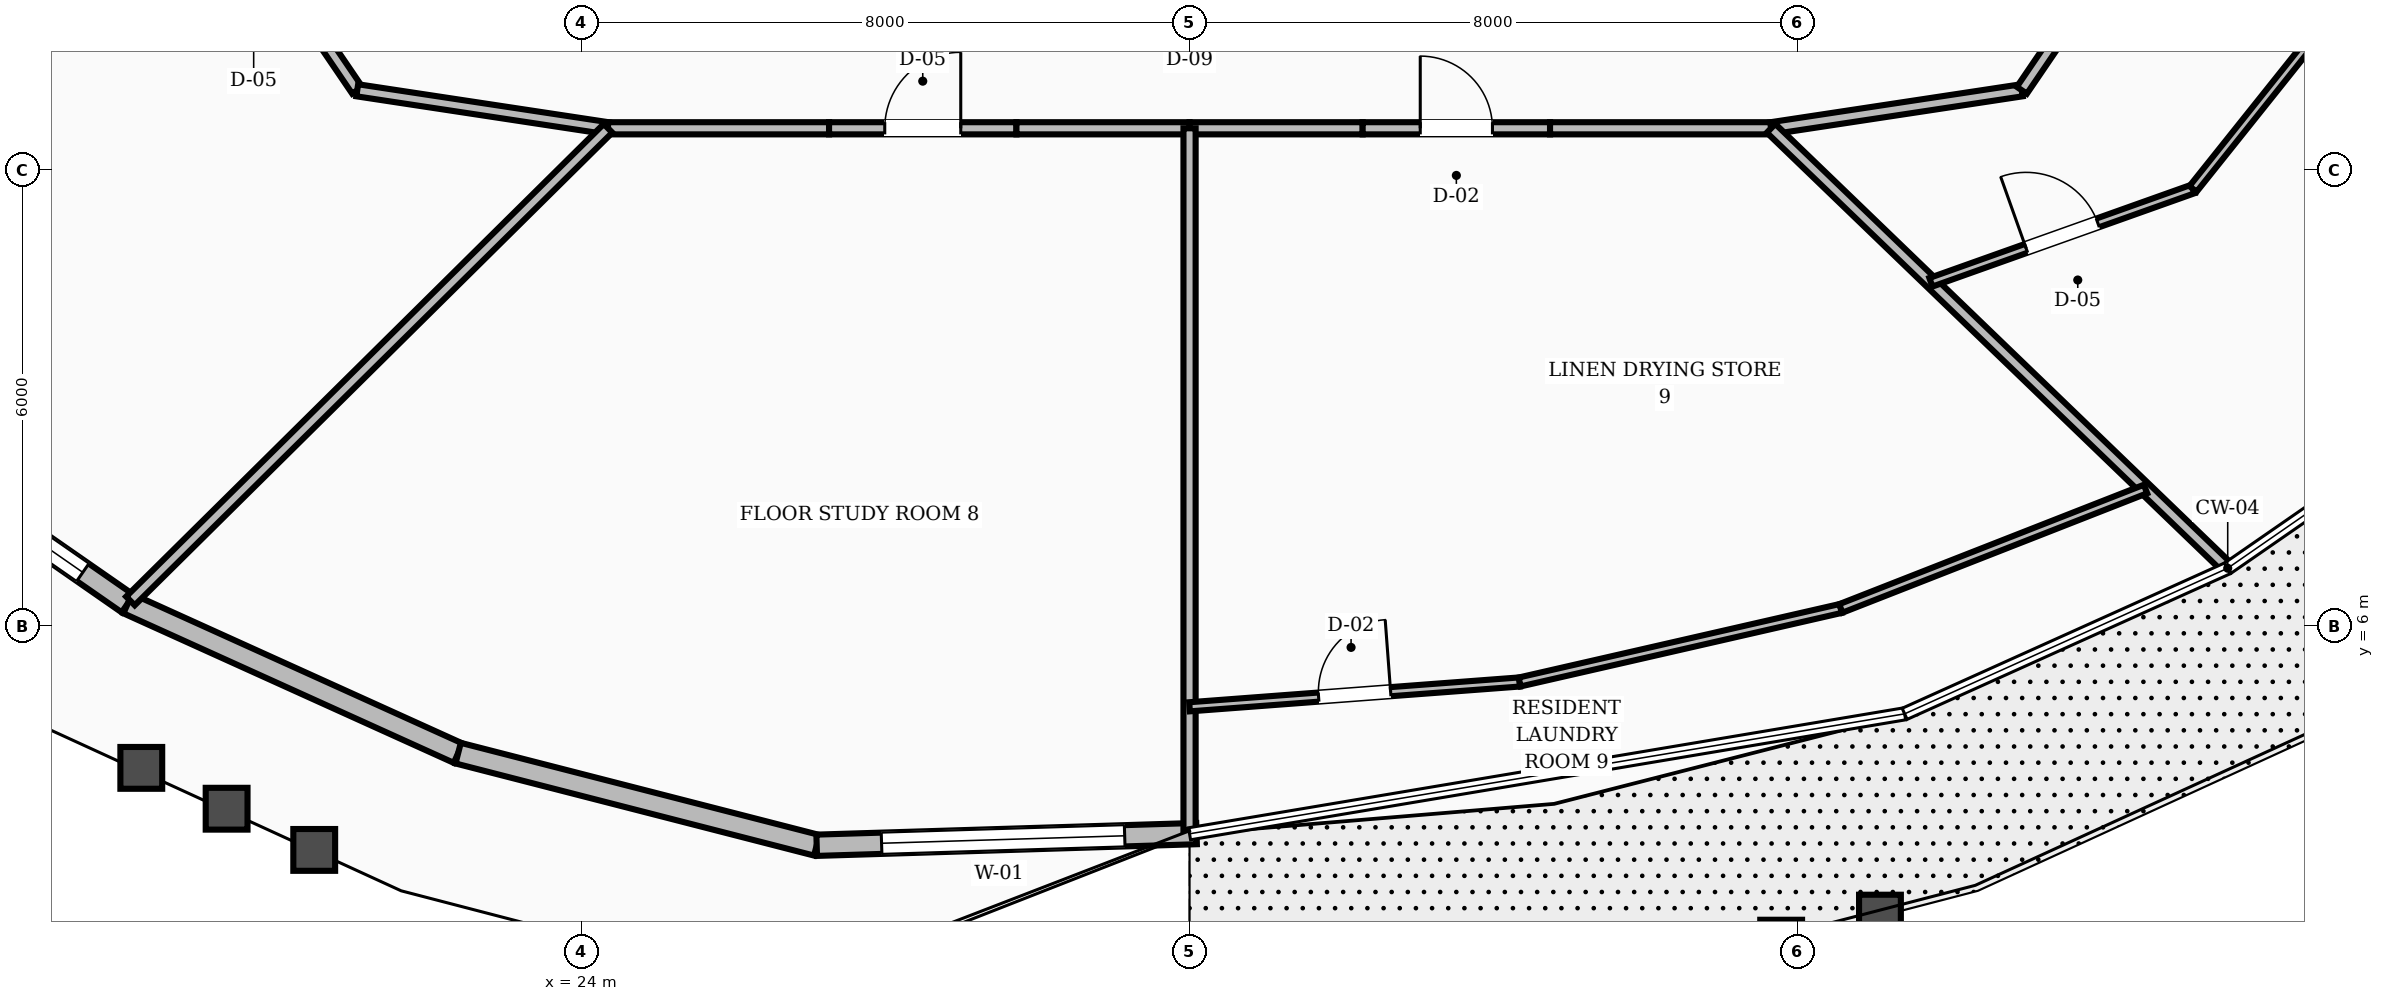
"""IFC4 building model, lengths in metres.
Left out: names, types, materials, properties, quantities, classifications, styles, units other than length and angle.
Written with IfcOpenShell. Run it as: python <this file> out.ifc"""

import sys

from ifc_helpers import new_model, si_unit, direction, frame, frame_2d, origin, place, context, subcontext, project, spatial, rectangle, extrude, element, fill, save


model = new_model("IFC4")
c1 = context("Model", 3, precision=1e-05, world=origin(), true_north=direction((0.0, 1.0)))
c2 = subcontext(c1, "Body", "Model", "MODEL_VIEW")
j1 = project(units=[si_unit("LENGTHUNIT", "METRE"), si_unit("PLANEANGLEUNIT", "RADIAN")], contexts=[c1])
p1 = place(None, origin())
s1 = spatial("IfcSite", under=j1, at=p1, CompositionType="ELEMENT")
p2 = place(p1, origin())
s2 = spatial("IfcBuilding", under=s1, at=p2, CompositionType="ELEMENT")
p3 = place(p2, frame((0.0, 0.0, 189.2)))
s3 = spatial("IfcBuildingStorey", under=s2, at=p3, CompositionType="ELEMENT", Elevation=189.2)
p4 = place(p3, frame((14.22, 8.945, 0.0), z_axis=(0.0, 0.0, 1.0), x_axis=(0.821202162047, -0.570637370885, 0.0)))
e1 = element("IfcWall", 1, at=p4, inside=s3, PredefinedType="STANDARD", context=c2, shape_type="SweptSolid", body=[
    extrude(rectangle(XDim=4.64, YDim=0.28, at=frame_2d((2.32, 0.0))), origin(), (0.0, 0.0, 1.0), 2.82),
])
p5 = place(p4, frame((0.72, 0.0, 0.8)))
e2 = element("IfcOpeningElement", 2, at=p5, cuts=e1, PredefinedType="OPENING", context=c2, shape_type="SweptSolid", body=[
    extrude(rectangle(XDim=3.2, YDim=1.65, at=frame_2d((1.6, 0.825))), frame((0.0, 0.15, 0.0), z_axis=(0.0, -1.0, 0.0), x_axis=(1.0, 0.0, 0.0)), (0.0, 0.0, 1.0), 0.3),
])
p6 = place(p3, frame((18.031, 6.297, 0.0), z_axis=(0.0, 0.0, 1.0), x_axis=(0.911004961114, -0.412395393798, 0.0)))
e3 = element("IfcWall", 3, at=p6, inside=s3, PredefinedType="STANDARD", context=c2, shape_type="SweptSolid", body=[
    extrude(rectangle(XDim=4.771, YDim=0.28, at=frame_2d((2.386, 0.0))), origin(), (0.0, 0.0, 1.0), 2.82),
])
p7 = place(p3, frame((22.378, 4.329, 0.0), z_axis=(0.0, 0.0, 1.0), x_axis=(0.968565442011, -0.248758888367, 0.0)))
e4 = element("IfcWall", 4, at=p7, inside=s3, PredefinedType="STANDARD", context=c2, shape_type="SweptSolid", body=[
    extrude(rectangle(XDim=4.87, YDim=0.28, at=frame_2d((2.435, 0.0))), origin(), (0.0, 0.0, 1.0), 2.82),
])
p8 = place(p3, frame((27.094, 3.118, 0.0), z_axis=(0.0, 0.0, 1.0), x_axis=(0.999528232308, 0.030713398052, 0.0)))
e5 = element("IfcWall", 5, at=p8, inside=s3, PredefinedType="STANDARD", context=c2, shape_type="SweptSolid", body=[
    extrude(rectangle(XDim=5.0, YDim=0.28, at=frame_2d((2.5, 0.0))), origin(), (0.0, 0.0, 1.0), 2.82),
])
p9 = place(p8, frame((0.854, 0.0, 0.8)))
e6 = element("IfcOpeningElement", 6, at=p9, cuts=e5, PredefinedType="OPENING", context=c2, shape_type="SweptSolid", body=[
    extrude(rectangle(XDim=3.2, YDim=1.65, at=frame_2d((1.6, 0.825))), frame((0.0, 0.15, 0.0), z_axis=(0.0, -1.0, 0.0), x_axis=(1.0, 0.0, 0.0)), (0.0, 0.0, 1.0), 0.3),
])
p10 = place(p3, frame((19.35, 15.548, 0.0), z_axis=(0.0, 0.0, 1.0), x_axis=(0.562674669208, -0.826678423955, 0.0)))
e7 = element("IfcWall", 7, at=p10, inside=s3, PredefinedType="SOLIDWALL", context=c2, shape_type="SweptSolid", body=[
    extrude(rectangle(XDim=3.021, YDim=0.16, at=frame_2d((1.511, 0.0))), origin(), (0.0, 0.0, 1.0), 2.8),
])
p11 = place(p10, frame((1.01, 0.0, 0.0)))
e8 = element("IfcOpeningElement", 8, at=p11, cuts=e7, PredefinedType="OPENING", context=c2, shape_type="SweptSolid", body=[
    extrude(rectangle(XDim=1.0, YDim=2.1, at=frame_2d((0.5, 1.05))), frame((0.0, 0.09, 0.0), z_axis=(0.0, -1.0, 0.0), x_axis=(1.0, 0.0, 0.0)), (0.0, 0.0, 1.0), 0.18),
])
p12 = place(p3, frame((21.05, 13.05, 0.0), z_axis=(0.0, 0.0, 1.0), x_axis=(0.988710906508, -0.149835721217, 0.0)))
e9 = element("IfcWall", 9, at=p12, inside=s3, PredefinedType="SOLIDWALL", context=c2, shape_type="SweptSolid", body=[
    extrude(rectangle(XDim=3.337, YDim=0.16, at=frame_2d((1.668, 0.0))), origin(), (0.0, 0.0, 1.0), 2.8),
])
p13 = place(p3, frame((24.349, 12.55, 0.0), z_axis=(0.0, 0.0, 1.0), x_axis=(1.0, 0.0, 0.0)))
e10 = element("IfcWall", 10, at=p13, inside=s3, PredefinedType="SOLIDWALL", context=c2, shape_type="SweptSolid", body=[
    extrude(rectangle(XDim=2.908, YDim=0.16, at=frame_2d((1.454, 0.0))), origin(), (0.0, 0.0, 1.0), 2.8),
])
p14 = place(p3, frame((27.257, 12.55, 0.0), z_axis=(0.0, 0.0, 1.0), x_axis=(1.0, 0.0, 0.0)))
e11 = element("IfcWall", 11, at=p14, inside=s3, PredefinedType="SOLIDWALL", context=c2, shape_type="SweptSolid", body=[
    extrude(rectangle(XDim=2.465, YDim=0.16, at=frame_2d((1.232, 0.0))), origin(), (0.0, 0.0, 1.0), 2.8),
])
p15 = place(p14, frame((0.733, 0.0, 0.0)))
e12 = element("IfcOpeningElement", 12, at=p15, cuts=e11, PredefinedType="OPENING", context=c2, shape_type="SweptSolid", body=[
    extrude(rectangle(XDim=1.0, YDim=2.1, at=frame_2d((0.5, 1.05))), frame((0.0, 0.09, 0.0), z_axis=(0.0, -1.0, 0.0), x_axis=(1.0, 0.0, 0.0)), (0.0, 0.0, 1.0), 0.18),
])
for number, where, z_axis, x_axis in (
    (13, (29.722, 12.55, 0.0), (0.0, 0.0, 1.0), (1.0, 0.0, 0.0)),
    (14, (32.0, 12.55, 0.0), (0.0, 0.0, 1.0), (1.0, 0.0, 0.0)),
):
    element("IfcWall", number, at=place(p3, frame(where, z_axis=z_axis, x_axis=x_axis)), inside=s3, PredefinedType="SOLIDWALL", context=c2, shape_type="SweptSolid", body=[
        extrude(rectangle(XDim=2.278, YDim=0.16, at=frame_2d((1.139, 0.0))), origin(), (0.0, 0.0, 1.0), 2.8),
    ])
p16 = place(p3, frame((34.278, 12.55, 0.0), z_axis=(0.0, 0.0, 1.0), x_axis=(1.0, 0.0, 0.0)))
e15 = element("IfcWall", 15, at=p16, inside=s3, PredefinedType="SOLIDWALL", context=c2, shape_type="SweptSolid", body=[
    extrude(rectangle(XDim=2.465, YDim=0.16, at=frame_2d((1.232, 0.0))), origin(), (0.0, 0.0, 1.0), 2.8),
])
p17 = place(p16, frame((0.758, 0.0, 0.0)))
e16 = element("IfcOpeningElement", 16, at=p17, cuts=e15, PredefinedType="OPENING", context=c2, shape_type="SweptSolid", body=[
    extrude(rectangle(XDim=0.95, YDim=2.1, at=frame_2d((0.475, 1.05))), frame((0.0, 0.09, 0.0), z_axis=(0.0, -1.0, 0.0), x_axis=(1.0, 0.0, 0.0)), (0.0, 0.0, 1.0), 0.18),
])
p18 = place(p3, frame((36.743, 12.55, 0.0), z_axis=(0.0, 0.0, 1.0), x_axis=(1.0, 0.0, 0.0)))
e17 = element("IfcWall", 17, at=p18, inside=s3, PredefinedType="SOLIDWALL", context=c2, shape_type="SweptSolid", body=[
    extrude(rectangle(XDim=2.908, YDim=0.16, at=frame_2d((1.454, 0.0))), origin(), (0.0, 0.0, 1.0), 2.8),
])
p19 = place(p3, frame((39.651, 12.55, 0.0), z_axis=(0.0, 0.0, 1.0), x_axis=(0.988710906508, 0.149835721217, 0.0)))
e18 = element("IfcWall", 18, at=p19, inside=s3, PredefinedType="SOLIDWALL", context=c2, shape_type="SweptSolid", body=[
    extrude(rectangle(XDim=3.337, YDim=0.16, at=frame_2d((1.668, 0.0))), origin(), (0.0, 0.0, 1.0), 2.8),
])
p20 = place(p3, frame((42.95, 13.05, 0.0), z_axis=(0.0, 0.0, 1.0), x_axis=(0.562674669208, 0.826678423955, 0.0)))
e19 = element("IfcWall", 19, at=p20, inside=s3, PredefinedType="SOLIDWALL", context=c2, shape_type="SweptSolid", body=[
    extrude(rectangle(XDim=3.021, YDim=0.16, at=frame_2d((1.511, 0.0))), origin(), (0.0, 0.0, 1.0), 2.8),
])
p21 = place(p3, frame((39.651, 12.55, 0.0), z_axis=(0.0, 0.0, 1.0), x_axis=(0.72017417734, -0.693793308048, 0.0)))
e20 = element("IfcWall", 20, at=p21, inside=s3, PredefinedType="SOLIDWALL", context=c2, shape_type="SweptSolid", body=[
    extrude(rectangle(XDim=8.292, YDim=0.16, at=frame_2d((4.146, 0.0))), origin(), (0.0, 0.0, 1.0), 2.8),
])
p22 = place(p3, frame((41.753, 10.524, 0.0), z_axis=(0.0, 0.0, 1.0), x_axis=(0.942114059341, 0.335292557615, 0.0)))
e21 = element("IfcWall", 21, at=p22, inside=s3, PredefinedType="PARTITIONING", context=c2, shape_type="SweptSolid", body=[
    extrude(rectangle(XDim=3.66, YDim=0.12, at=frame_2d((1.83, 0.0))), origin(), (0.0, 0.0, 1.0), 2.8),
])
p23 = place(p22, frame((1.33, 0.0, 0.0)))
e22 = element("IfcOpeningElement", 22, at=p23, cuts=e21, PredefinedType="OPENING", context=c2, shape_type="SweptSolid", body=[
    extrude(rectangle(XDim=1.0, YDim=2.1, at=frame_2d((0.5, 1.05))), frame((0.0, 0.07, 0.0), z_axis=(0.0, -1.0, 0.0), x_axis=(1.0, 0.0, 0.0)), (0.0, 0.0, 1.0), 0.14),
])
p24 = place(p3, frame((45.202, 11.752, 0.0), z_axis=(0.0, 0.0, 1.0), x_axis=(0.624079707302, 0.781360684277, 0.0)))
e23 = element("IfcWall", 23, at=p24, inside=s3, PredefinedType="PARTITIONING", context=c2, shape_type="SweptSolid", body=[
    extrude(rectangle(XDim=3.485, YDim=0.12, at=frame_2d((1.742, 0.0))), origin(), (0.0, 0.0, 1.0), 2.8),
])
p25 = place(p3, frame((24.349, 12.55, 0.0), z_axis=(0.0, 0.0, 1.0), x_axis=(-0.710784209706, -0.703410127332, 0.0)))
e24 = element("IfcWall", 24, at=p25, inside=s3, PredefinedType="SOLIDWALL", context=c2, shape_type="SweptSolid", body=[
    extrude(rectangle(XDim=8.84, YDim=0.16, at=frame_2d((4.42, 0.0))), origin(), (0.0, 0.0, 1.0), 2.8),
])
p26 = place(p3, frame((32.0, 12.55, 0.0), z_axis=(0.0, 0.0, 1.0), x_axis=(0.0, -1.0, 0.0)))
e25 = element("IfcWall", 25, at=p26, inside=s3, PredefinedType="SOLIDWALL", context=c2, shape_type="SweptSolid", body=[
    extrude(rectangle(XDim=9.231, YDim=0.16, at=frame_2d((4.616, 0.0))), origin(), (0.0, 0.0, 1.0), 2.8),
])
p27 = place(p3, frame((32.0, 4.939, 0.0), z_axis=(0.0, 0.0, 1.0), x_axis=(0.99718298056, 0.075007354845, 0.0)))
e26 = element("IfcWall", 26, at=p27, inside=s3, PredefinedType="PARTITIONING", context=c2, shape_type="SweptSolid", body=[
    extrude(rectangle(XDim=4.355, YDim=0.12, at=frame_2d((2.177, 0.0))), origin(), (0.0, 0.0, 1.0), 2.8),
])
p28 = place(p27, frame((1.703, 0.0, 0.0)))
e27 = element("IfcOpeningElement", 27, at=p28, cuts=e26, PredefinedType="OPENING", context=c2, shape_type="SweptSolid", body=[
    extrude(rectangle(XDim=0.95, YDim=2.1, at=frame_2d((0.475, 1.05))), frame((0.0, 0.07, 0.0), z_axis=(0.0, -1.0, 0.0), x_axis=(1.0, 0.0, 0.0)), (0.0, 0.0, 1.0), 0.14),
])
p29 = place(p3, frame((36.343, 5.266, 0.0), z_axis=(0.0, 0.0, 1.0), x_axis=(0.974783645489, 0.223152065836, 0.0)))
e28 = element("IfcWall", 28, at=p29, inside=s3, PredefinedType="PARTITIONING", context=c2, shape_type="SweptSolid", body=[
    extrude(rectangle(XDim=4.335, YDim=0.12, at=frame_2d((2.167, 0.0))), origin(), (0.0, 0.0, 1.0), 2.8),
])
p30 = place(p3, frame((40.568, 6.233, 0.0), z_axis=(0.0, 0.0, 1.0), x_axis=(0.931054421881, 0.36488034134, 0.0)))
e29 = element("IfcWall", 29, at=p30, inside=s3, PredefinedType="PARTITIONING", context=c2, shape_type="SweptSolid", body=[
    extrude(rectangle(XDim=4.306, YDim=0.12, at=frame_2d((2.153, 0.0))), origin(), (0.0, 0.0, 1.0), 2.8),
])
p31 = place(p5, origin())
e30 = element("IfcWindow", 30, at=p31, inside=s3, PartitioningType="SINGLE_PANEL", PredefinedType="WINDOW", context=c2, shape_type="SweptSolid", body=[
    extrude(rectangle(XDim=3.2, YDim=1.65, at=frame_2d((1.6, 0.825))), frame((0.0, 0.03, 0.0), z_axis=(0.0, -1.0, 0.0), x_axis=(1.0, 0.0, 0.0)), (0.0, 0.0, 1.0), 0.06),
])
fill(e2, e30)
p32 = place(p9, origin())
e31 = element("IfcWindow", 31, at=p32, inside=s3, PartitioningType="SINGLE_PANEL", PredefinedType="WINDOW", context=c2, shape_type="SweptSolid", body=[
    extrude(rectangle(XDim=3.2, YDim=1.65, at=frame_2d((1.6, 0.825))), frame((0.0, 0.03, 0.0), z_axis=(0.0, -1.0, 0.0), x_axis=(1.0, 0.0, 0.0)), (0.0, 0.0, 1.0), 0.06),
])
fill(e6, e31)
p33 = place(p23, origin())
e32 = element("IfcDoor", 32, at=p33, inside=s3, OperationType="SINGLE_SWING_LEFT", PredefinedType="DOOR", context=c2, shape_type="SweptSolid", body=[
    extrude(rectangle(XDim=1.0, YDim=2.1, at=frame_2d((0.5, 1.05))), frame((0.0, 0.025, 0.0), z_axis=(0.0, -1.0, 0.0), x_axis=(1.0, 0.0, 0.0)), (0.0, 0.0, 1.0), 0.05),
])
fill(e22, e32)
p34 = place(p15, origin())
e33 = element("IfcDoor", 33, at=p34, inside=s3, OperationType="SINGLE_SWING_RIGHT", PredefinedType="DOOR", context=c2, shape_type="SweptSolid", body=[
    extrude(rectangle(XDim=1.0, YDim=2.1, at=frame_2d((0.5, 1.05))), frame((0.0, 0.025, 0.0), z_axis=(0.0, -1.0, 0.0), x_axis=(1.0, 0.0, 0.0)), (0.0, 0.0, 1.0), 0.05),
])
fill(e12, e33)
p35 = place(p17, origin())
e34 = element("IfcDoor", 34, at=p35, inside=s3, OperationType="SINGLE_SWING_LEFT", PredefinedType="DOOR", context=c2, shape_type="SweptSolid", body=[
    extrude(rectangle(XDim=0.95, YDim=2.1, at=frame_2d((0.475, 1.05))), frame((0.0, 0.025, 0.0), z_axis=(0.0, -1.0, 0.0), x_axis=(1.0, 0.0, 0.0)), (0.0, 0.0, 1.0), 0.05),
])
fill(e16, e34)
p36 = place(p28, origin())
e35 = element("IfcDoor", 35, at=p36, inside=s3, OperationType="SINGLE_SWING_RIGHT", PredefinedType="DOOR", context=c2, shape_type="SweptSolid", body=[
    extrude(rectangle(XDim=0.95, YDim=2.1, at=frame_2d((0.475, 1.05))), frame((0.0, 0.025, 0.0), z_axis=(0.0, -1.0, 0.0), x_axis=(1.0, 0.0, 0.0)), (0.0, 0.0, 1.0), 0.05),
])
fill(e27, e35)
save(model, sys.argv[1])
